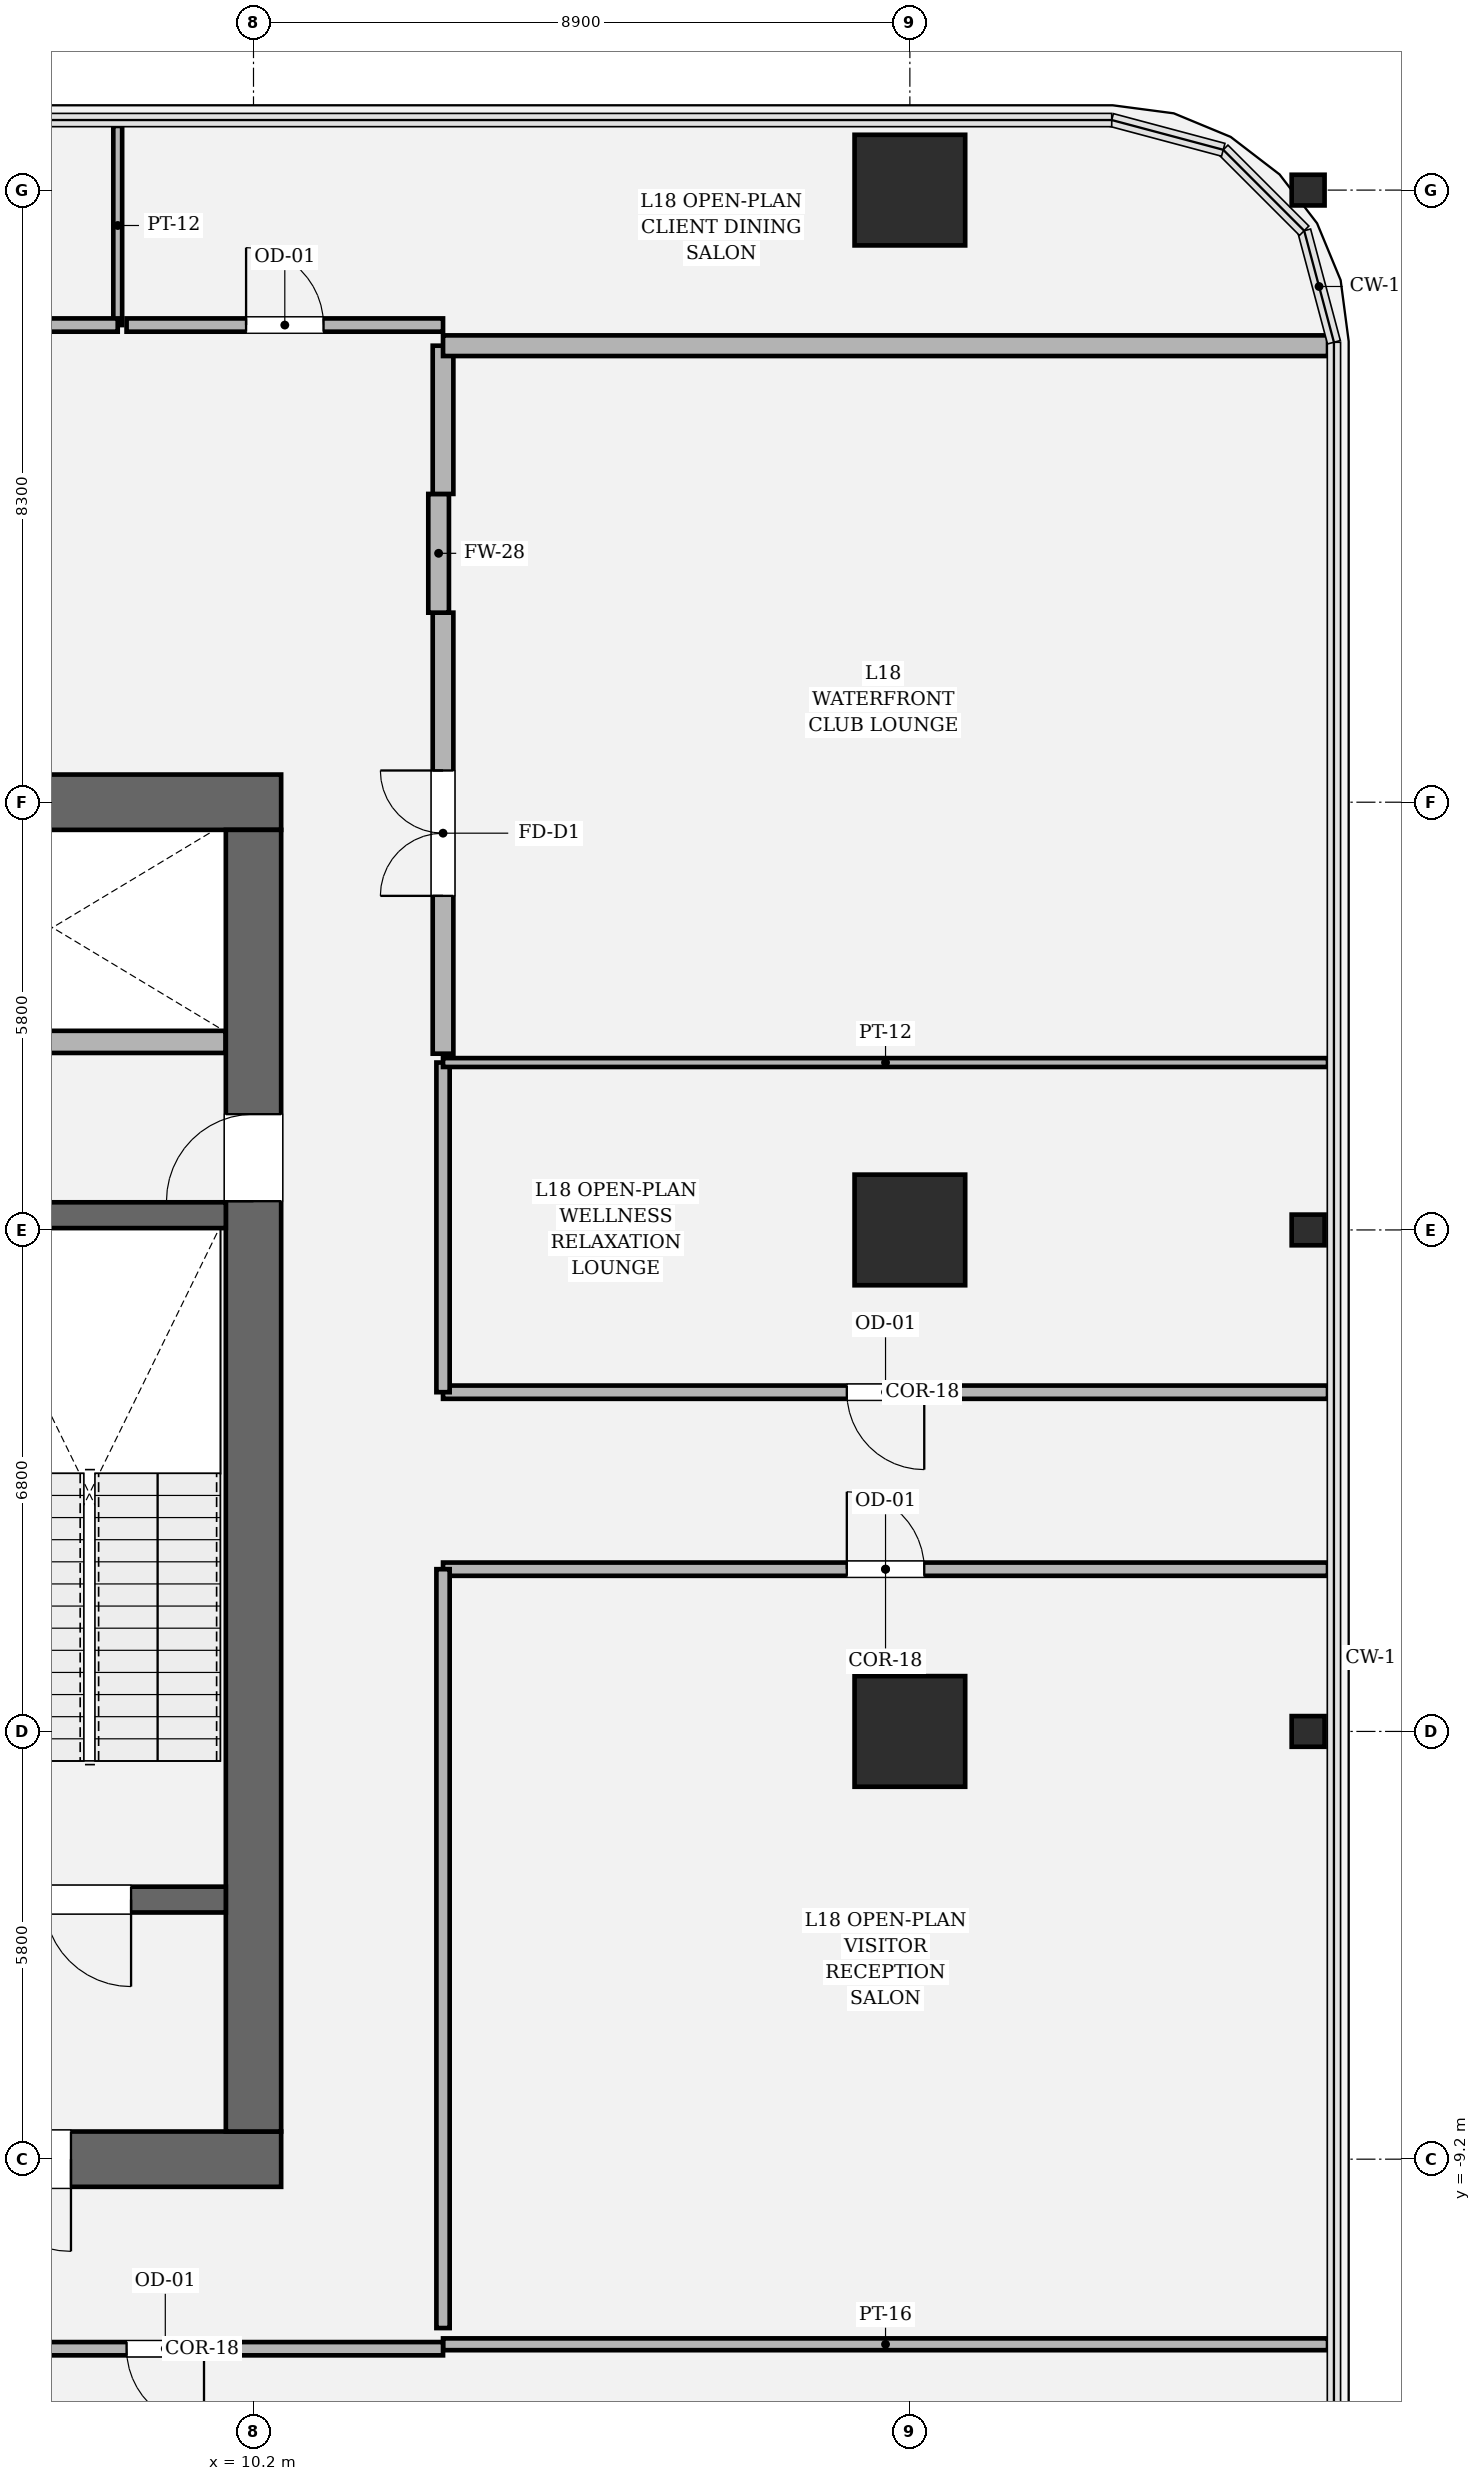
"""IFC4 building model, lengths in metres.
Left out: names, types, materials, properties, quantities, classifications, styles, units other than length and angle.
Written with IfcOpenShell. Run it as: python <this file> out.ifc"""

import sys

from ifc_helpers import new_model, si_unit, direction, frame, frame_2d, origin, origin_2d, place, context, subcontext, project, spatial, rectangle, hollow_rectangle, i_section, extrude, element, fill, save


model = new_model("IFC4")
c1 = context("Model", 3, precision=1e-05, world=origin(), true_north=direction((0.0, 1.0)))
c2 = subcontext(c1, "Body", "Model", "MODEL_VIEW")
j1 = project(units=[si_unit("LENGTHUNIT", "METRE"), si_unit("PLANEANGLEUNIT", "RADIAN")], contexts=[c1])
p1 = place(None, origin())
s1 = spatial("IfcSite", under=j1, at=p1, CompositionType="ELEMENT")
p2 = place(p1, origin())
s2 = spatial("IfcBuilding", under=s1, at=p2, CompositionType="ELEMENT")
p3 = place(p2, frame((0.0, 0.0, 80.85)))
s3 = spatial("IfcBuildingStorey", under=s2, at=p3, CompositionType="ELEMENT", Elevation=80.85)
p4 = place(p3, frame((10.575, -9.2, 0.0), z_axis=(0.0, 0.0, 1.0), x_axis=(-1.0, 0.0, 0.0)))
e1 = element("IfcWall", 1, at=p4, inside=s3, PredefinedType="SHEAR", context=c2, shape_type="SweptSolid", body=[
    extrude(rectangle(XDim=21.15, YDim=0.75, at=frame_2d((10.575, 0.0))), origin(), (0.0, 0.0, 1.0), 4.05),
])
p5 = place(p4, frame((2.85, 0.0, 0.0)))
e2 = element("IfcOpeningElement", 2, at=p5, cuts=e1, PredefinedType="OPENING", context=c2, shape_type="SweptSolid", body=[
    extrude(rectangle(XDim=1.25, YDim=2.25, at=frame_2d((0.625, 1.125))), frame((0.0, 0.385, 0.0), z_axis=(0.0, -1.0, 0.0), x_axis=(1.0, 0.0, 0.0)), (0.0, 0.0, 1.0), 0.77),
])
p6 = place(p4, frame((17.05, 0.0, 0.0)))
e3 = element("IfcOpeningElement", 3, at=p6, cuts=e1, PredefinedType="OPENING", context=c2, shape_type="SweptSolid", body=[
    extrude(rectangle(XDim=1.25, YDim=2.25, at=frame_2d((0.625, 1.125))), frame((0.0, 0.385, 0.0), z_axis=(0.0, -1.0, 0.0), x_axis=(1.0, 0.0, 0.0)), (0.0, 0.0, 1.0), 0.77),
])
p7 = place(p3, frame((-10.575, 9.2, 0.0), z_axis=(0.0, 0.0, 1.0), x_axis=(1.0, 0.0, 0.0)))
e4 = element("IfcWall", 4, at=p7, inside=s3, PredefinedType="SHEAR", context=c2, shape_type="SweptSolid", body=[
    extrude(rectangle(XDim=21.15, YDim=0.75, at=frame_2d((10.575, 0.0))), origin(), (0.0, 0.0, 1.0), 4.05),
])
p8 = place(p3, frame((10.2, 8.825, 0.0), z_axis=(0.0, 0.0, 1.0), x_axis=(0.0, -1.0, 0.0)))
e5 = element("IfcWall", 5, at=p8, inside=s3, PredefinedType="SHEAR", context=c2, shape_type="SweptSolid", body=[
    extrude(rectangle(XDim=17.65, YDim=0.75, at=frame_2d((8.825, 0.0))), origin(), (0.0, 0.0, 1.0), 4.05),
])
p9 = place(p8, frame((3.855, 0.0, 0.0)))
e6 = element("IfcOpeningElement", 6, at=p9, cuts=e5, PredefinedType="OPENING", context=c2, shape_type="SweptSolid", body=[
    extrude(rectangle(XDim=1.18, YDim=2.2, at=frame_2d((0.59, 1.1))), frame((0.0, 0.385, 0.0), z_axis=(0.0, -1.0, 0.0), x_axis=(1.0, 0.0, 0.0)), (0.0, 0.0, 1.0), 0.77),
])
p10 = place(p3, frame((4.65, -5.68, 0.0), z_axis=(0.0, 0.0, 1.0), x_axis=(1.0, 0.0, 0.0)))
e7 = element("IfcWall", 7, at=p10, inside=s3, PredefinedType="SOLIDWALL", context=c2, shape_type="SweptSolid", body=[
    extrude(rectangle(XDim=5.175, YDim=0.35, at=frame_2d((2.587, 0.0))), origin(), (0.0, 0.0, 1.0), 4.05),
])
p11 = place(p10, frame((2.71, 0.0, 0.0)))
e8 = element("IfcOpeningElement", 8, at=p11, cuts=e7, PredefinedType="OPENING", context=c2, shape_type="SweptSolid", body=[
    extrude(rectangle(XDim=1.18, YDim=2.2, at=frame_2d((0.59, 1.1))), frame((0.0, 0.185, 0.0), z_axis=(0.0, -1.0, 0.0), x_axis=(1.0, 0.0, 0.0)), (0.0, 0.0, 1.0), 0.37),
])
p12 = place(p3, frame((4.65, 3.6, 0.0), z_axis=(0.0, 0.0, 1.0), x_axis=(1.0, 0.0, 0.0)))
e9 = element("IfcWall", 9, at=p12, inside=s3, PredefinedType="SOLIDWALL", context=c2, shape_type="SweptSolid", body=[
    extrude(rectangle(XDim=5.175, YDim=0.35, at=frame_2d((2.587, 0.0))), origin(), (0.0, 0.0, 1.0), 4.05),
])
for number, where, z_axis, x_axis in (
    (10, (19.1, -3.4, 0.0), (0.0, 0.0, 1.0), (1.0, 0.0, 0.0)),
    (11, (19.1, 3.4, 0.0), (0.0, 0.0, 1.0), (1.0, 0.0, 0.0)),
    (12, (19.1, 17.5, 0.0), (0.0, 0.0, 1.0), (1.0, 0.0, 0.0)),
):
    element("IfcColumn", number, at=place(p3, frame(where, z_axis=z_axis, x_axis=x_axis)), inside=s3, PredefinedType="COLUMN", context=c2, shape_type="SweptSolid", body=[
        extrude(hollow_rectangle(XDim=1.5, YDim=1.5, WallThickness=0.045, at=origin_2d()), origin(), (0.0, 0.0, 1.0), 4.05),
    ])
for number, where, z_axis, x_axis in (
    (13, (24.5, -3.4, 0.0), (0.0, 0.0, 1.0), (0.0, 1.0, 0.0)),
    (14, (24.5, 3.4, 0.0), (0.0, 0.0, 1.0), (0.0, 1.0, 0.0)),
    (15, (24.5, 17.5, 0.0), (0.0, 0.0, 1.0), (0.0, 1.0, 0.0)),
):
    element("IfcColumn", number, at=place(p3, frame(where, z_axis=z_axis, x_axis=x_axis)), inside=s3, PredefinedType="COLUMN", context=c2, shape_type="SweptSolid", body=[
        extrude(i_section(OverallWidth=0.416, OverallDepth=0.446, WebThickness=0.039, FlangeThickness=0.062, FilletRadius=0.018, at=origin_2d()), origin(), (0.0, 0.0, 1.0), 4.048),
    ])
p13 = place(p3, frame((5.06, 5.95, 0.0), z_axis=(0.0, 0.0, 1.0), x_axis=(1.0, 0.0, 0.0)))
e16 = element("IfcWall", 16, at=p13, inside=s3, PredefinedType="SOLIDWALL", context=c2, shape_type="SweptSolid", body=[
    extrude(rectangle(XDim=4.76, YDim=0.3, at=frame_2d((2.38, 0.0))), origin(), (0.0, 0.0, 1.0), 3.81),
])
p14 = place(p3, frame((12.77, -11.71, 0.0), z_axis=(0.0, 0.0, 1.0), x_axis=(1.0, 0.0, 0.0)))
e17 = element("IfcWall", 17, at=p14, inside=s3, PredefinedType="PARTITIONING", context=c2, shape_type="SweptSolid", body=[
    extrude(rectangle(XDim=12.0, YDim=0.16, at=frame_2d((6.0, 0.0))), origin(), (0.0, 0.0, 1.0), 2.524),
])
p15 = place(p3, frame((5.238, -11.77, 0.0), z_axis=(0.0, 0.0, 1.0), x_axis=(1.0, 0.0, 0.0)))
e18 = element("IfcWall", 18, at=p15, inside=s3, PredefinedType="PARTITIONING", context=c2, shape_type="SweptSolid", body=[
    extrude(rectangle(XDim=7.532, YDim=0.18, at=frame_2d((3.766, 0.0))), origin(), (0.0, 0.0, 1.0), 3.104),
])
p16 = place(p15, frame((3.241, 0.0, 0.0)))
e19 = element("IfcOpeningElement", 19, at=p16, cuts=e18, PredefinedType="OPENING", context=c2, shape_type="SweptSolid", body=[
    extrude(rectangle(XDim=1.05, YDim=2.2, at=frame_2d((0.525, 1.1))), frame((0.0, 0.1, 0.0), z_axis=(0.0, -1.0, 0.0), x_axis=(1.0, 0.0, 0.0)), (0.0, 0.0, 1.0), 0.2),
])
p17 = place(p3, frame((12.77, -1.2, 0.0), z_axis=(0.0, 0.0, 1.0), x_axis=(1.0, 0.0, 0.0)))
e20 = element("IfcWall", 20, at=p17, inside=s3, PredefinedType="PARTITIONING", context=c2, shape_type="SweptSolid", body=[
    extrude(rectangle(XDim=12.0, YDim=0.18, at=frame_2d((6.0, 0.0))), origin(), (0.0, 0.0, 1.0), 2.524),
])
p18 = place(p17, frame((5.475, 0.0, 0.0)))
e21 = element("IfcOpeningElement", 21, at=p18, cuts=e20, PredefinedType="OPENING", context=c2, shape_type="SweptSolid", body=[
    extrude(rectangle(XDim=1.05, YDim=2.2, at=frame_2d((0.525, 1.1))), frame((0.0, 0.1, 0.0), z_axis=(0.0, -1.0, 0.0), x_axis=(1.0, 0.0, 0.0)), (0.0, 0.0, 1.0), 0.2),
])
p19 = place(p3, frame((12.77, -11.49, 0.0), z_axis=(0.0, 0.0, 1.0), x_axis=(0.0, 1.0, 0.0)))
e22 = element("IfcWall", 22, at=p19, inside=s3, PredefinedType="PARTITIONING", context=c2, shape_type="SweptSolid", body=[
    extrude(rectangle(XDim=10.29, YDim=0.18, at=frame_2d((5.145, 0.0))), origin(), (0.0, 0.0, 1.0), 3.104),
])
p20 = place(p3, frame((24.77, 1.2, 0.0), z_axis=(0.0, 0.0, 1.0), x_axis=(-1.0, 0.0, 0.0)))
e23 = element("IfcWall", 23, at=p20, inside=s3, PredefinedType="PARTITIONING", context=c2, shape_type="SweptSolid", body=[
    extrude(rectangle(XDim=12.0, YDim=0.18, at=frame_2d((6.0, 0.0))), origin(), (0.0, 0.0, 1.0), 2.524),
])
p21 = place(p20, frame((5.475, 0.0, 0.0)))
e24 = element("IfcOpeningElement", 24, at=p21, cuts=e23, PredefinedType="OPENING", context=c2, shape_type="SweptSolid", body=[
    extrude(rectangle(XDim=1.05, YDim=2.2, at=frame_2d((0.525, 1.1))), frame((0.0, 0.1, 0.0), z_axis=(0.0, -1.0, 0.0), x_axis=(1.0, 0.0, 0.0)), (0.0, 0.0, 1.0), 0.2),
])
p22 = place(p3, frame((12.77, 1.2, 0.0), z_axis=(0.0, 0.0, 1.0), x_axis=(0.0, 1.0, 0.0)))
e25 = element("IfcWall", 25, at=p22, inside=s3, PredefinedType="PARTITIONING", context=c2, shape_type="SweptSolid", body=[
    extrude(rectangle(XDim=4.47, YDim=0.18, at=frame_2d((2.235, 0.0))), origin(), (0.0, 0.0, 1.0), 3.104),
])
p23 = place(p3, frame((12.77, 5.67, 0.0), z_axis=(0.0, 0.0, 1.0), x_axis=(1.0, 0.0, 0.0)))
e26 = element("IfcWall", 26, at=p23, inside=s3, PredefinedType="PARTITIONING", context=c2, shape_type="SweptSolid", body=[
    extrude(rectangle(XDim=12.0, YDim=0.12, at=frame_2d((6.0, 0.0))), origin(), (0.0, 0.0, 1.0), 2.524),
])
p24 = place(p3, frame((12.77, 5.79, 0.0), z_axis=(0.0, 0.0, 1.0), x_axis=(0.0, 1.0, 0.0)))
e27 = element("IfcWall", 27, at=p24, inside=s3, PredefinedType="SOLIDWALL", context=c2, shape_type="SweptSolid", body=[
    extrude(rectangle(XDim=5.98, YDim=0.28, at=frame_2d((2.99, 0.0))), origin(), (0.0, 0.0, 1.0), 3.104),
])
p25 = place(p24, frame((2.14, 0.0, 0.0)))
e28 = element("IfcOpeningElement", 28, at=p25, cuts=e27, PredefinedType="OPENING", context=c2, shape_type="SweptSolid", body=[
    extrude(rectangle(XDim=1.7, YDim=2.3, at=frame_2d((0.85, 1.15))), frame((0.0, 0.15, 0.0), z_axis=(0.0, -1.0, 0.0), x_axis=(1.0, 0.0, 0.0)), (0.0, 0.0, 1.0), 0.3),
])
p26 = place(p3, frame((12.71, 11.77, 0.0), z_axis=(0.0, 0.0, 1.0), x_axis=(0.0, 1.0, 0.0)))
e29 = element("IfcWall", 29, at=p26, inside=s3, PredefinedType="SOLIDWALL", context=c2, shape_type="SweptSolid", body=[
    extrude(rectangle(XDim=1.61, YDim=0.28, at=frame_2d((0.805, 0.0))), origin(), (0.0, 0.0, 1.0), 3.354),
])
p27 = place(p3, frame((12.77, 13.38, 0.0), z_axis=(0.0, 0.0, 1.0), x_axis=(0.0, 1.0, 0.0)))
e30 = element("IfcWall", 30, at=p27, inside=s3, PredefinedType="SOLIDWALL", context=c2, shape_type="SweptSolid", body=[
    extrude(rectangle(XDim=2.01, YDim=0.28, at=frame_2d((1.005, 0.0))), origin(), (0.0, 0.0, 1.0), 3.354),
])
p28 = place(p3, frame((12.77, 15.39, 0.0), z_axis=(0.0, 0.0, 1.0), x_axis=(1.0, 0.0, 0.0)))
e31 = element("IfcWall", 31, at=p28, inside=s3, PredefinedType="SOLIDWALL", context=c2, shape_type="SweptSolid", body=[
    extrude(rectangle(XDim=12.0, YDim=0.28, at=frame_2d((6.0, 0.0))), origin(), (0.0, 0.0, 1.0), 2.524),
])
p29 = place(p3, frame((8.359, 18.37, 0.0), z_axis=(0.0, 0.0, 1.0), x_axis=(0.0, -1.0, 0.0)))
e32 = element("IfcWall", 32, at=p29, inside=s3, PredefinedType="PARTITIONING", context=c2, shape_type="SweptSolid", body=[
    extrude(rectangle(XDim=2.7, YDim=0.12, at=frame_2d((1.35, 0.0))), origin(), (0.0, 0.0, 1.0), 3.104),
])
p30 = place(p3, frame((8.359, 15.67, 0.0), z_axis=(0.0, 0.0, 1.0), x_axis=(-1.0, 0.0, 0.0)))
e33 = element("IfcWall", 33, at=p30, inside=s3, PredefinedType="PARTITIONING", context=c2, shape_type="SweptSolid", body=[
    extrude(rectangle(XDim=10.066, YDim=0.18, at=frame_2d((5.033, 0.0))), origin(), (0.0, 0.0, 1.0), 3.104),
])
p31 = place(p30, frame((5.858, 0.0, 0.0)))
e34 = element("IfcOpeningElement", 34, at=p31, cuts=e33, PredefinedType="OPENING", context=c2, shape_type="SweptSolid", body=[
    extrude(rectangle(XDim=1.05, YDim=2.2, at=frame_2d((0.525, 1.1))), frame((0.0, 0.1, 0.0), z_axis=(0.0, -1.0, 0.0), x_axis=(1.0, 0.0, 0.0)), (0.0, 0.0, 1.0), 0.2),
])
p32 = place(p3, frame((12.77, 15.67, 0.0), z_axis=(0.0, 0.0, 1.0), x_axis=(-1.0, 0.0, 0.0)))
e35 = element("IfcWall", 35, at=p32, inside=s3, PredefinedType="PARTITIONING", context=c2, shape_type="SweptSolid", body=[
    extrude(rectangle(XDim=4.291, YDim=0.18, at=frame_2d((2.146, 0.0))), origin(), (0.0, 0.0, 1.0), 3.104),
])
p33 = place(p32, frame((1.621, 0.0, 0.0)))
e36 = element("IfcOpeningElement", 36, at=p33, cuts=e35, PredefinedType="OPENING", context=c2, shape_type="SweptSolid", body=[
    extrude(rectangle(XDim=1.05, YDim=2.2, at=frame_2d((0.525, 1.1))), frame((0.0, 0.1, 0.0), z_axis=(0.0, -1.0, 0.0), x_axis=(1.0, 0.0, 0.0)), (0.0, 0.0, 1.0), 0.2),
])
p34 = place(p11, origin())
e37 = element("IfcDoor", 37, at=p34, inside=s3, OperationType="SINGLE_SWING_RIGHT", PredefinedType="DOOR", context=c2, shape_type="SweptSolid", body=[
    extrude(rectangle(XDim=1.18, YDim=2.2, at=frame_2d((0.59, 1.1))), frame((0.0, 0.025, 0.0), z_axis=(0.0, -1.0, 0.0), x_axis=(1.0, 0.0, 0.0)), (0.0, 0.0, 1.0), 0.05),
])
fill(e8, e37)
p35 = place(p5, origin())
e38 = element("IfcDoor", 38, at=p35, inside=s3, OperationType="SINGLE_SWING_LEFT", PredefinedType="DOOR", context=c2, shape_type="SweptSolid", body=[
    extrude(rectangle(XDim=1.25, YDim=2.25, at=frame_2d((0.625, 1.125))), frame((0.0, 0.025, 0.0), z_axis=(0.0, -1.0, 0.0), x_axis=(1.0, 0.0, 0.0)), (0.0, 0.0, 1.0), 0.05),
])
fill(e2, e38)
p36 = place(p9, origin())
e39 = element("IfcDoor", 39, at=p36, inside=s3, OperationType="SINGLE_SWING_RIGHT", PredefinedType="DOOR", context=c2, shape_type="SweptSolid", body=[
    extrude(rectangle(XDim=1.18, YDim=2.2, at=frame_2d((0.59, 1.1))), frame((0.0, 0.025, 0.0), z_axis=(0.0, -1.0, 0.0), x_axis=(1.0, 0.0, 0.0)), (0.0, 0.0, 1.0), 0.05),
])
fill(e6, e39)
p37 = place(p16, origin())
e40 = element("IfcDoor", 40, at=p37, inside=s3, OperationType="SINGLE_SWING_RIGHT", PredefinedType="DOOR", context=c2, shape_type="SweptSolid", body=[
    extrude(rectangle(XDim=1.05, YDim=2.2, at=frame_2d((0.525, 1.1))), frame((0.0, 0.025, 0.0), z_axis=(0.0, -1.0, 0.0), x_axis=(1.0, 0.0, 0.0)), (0.0, 0.0, 1.0), 0.05),
])
fill(e19, e40)
p38 = place(p18, origin())
e41 = element("IfcDoor", 41, at=p38, inside=s3, OperationType="SINGLE_SWING_LEFT", PredefinedType="DOOR", context=c2, shape_type="SweptSolid", body=[
    extrude(rectangle(XDim=1.05, YDim=2.2, at=frame_2d((0.525, 1.1))), frame((0.0, 0.025, 0.0), z_axis=(0.0, -1.0, 0.0), x_axis=(1.0, 0.0, 0.0)), (0.0, 0.0, 1.0), 0.05),
])
fill(e21, e41)
p39 = place(p21, origin())
e42 = element("IfcDoor", 42, at=p39, inside=s3, OperationType="SINGLE_SWING_LEFT", PredefinedType="DOOR", context=c2, shape_type="SweptSolid", body=[
    extrude(rectangle(XDim=1.05, YDim=2.2, at=frame_2d((0.525, 1.1))), frame((0.0, 0.025, 0.0), z_axis=(0.0, -1.0, 0.0), x_axis=(1.0, 0.0, 0.0)), (0.0, 0.0, 1.0), 0.05),
])
fill(e24, e42)
p40 = place(p25, origin())
e43 = element("IfcDoor", 43, at=p40, inside=s3, OperationType="DOUBLE_DOOR_SINGLE_SWING", PredefinedType="DOOR", context=c2, shape_type="SweptSolid", body=[
    extrude(rectangle(XDim=1.7, YDim=2.3, at=frame_2d((0.85, 1.15))), frame((0.0, 0.025, 0.0), z_axis=(0.0, -1.0, 0.0), x_axis=(1.0, 0.0, 0.0)), (0.0, 0.0, 1.0), 0.05),
])
fill(e28, e43)
p41 = place(p33, origin())
e44 = element("IfcDoor", 44, at=p41, inside=s3, OperationType="SINGLE_SWING_RIGHT", PredefinedType="DOOR", context=c2, shape_type="SweptSolid", body=[
    extrude(rectangle(XDim=1.05, YDim=2.2, at=frame_2d((0.525, 1.1))), frame((0.0, 0.025, 0.0), z_axis=(0.0, -1.0, 0.0), x_axis=(1.0, 0.0, 0.0)), (0.0, 0.0, 1.0), 0.05),
])
fill(e36, e44)
save(model, sys.argv[1])
